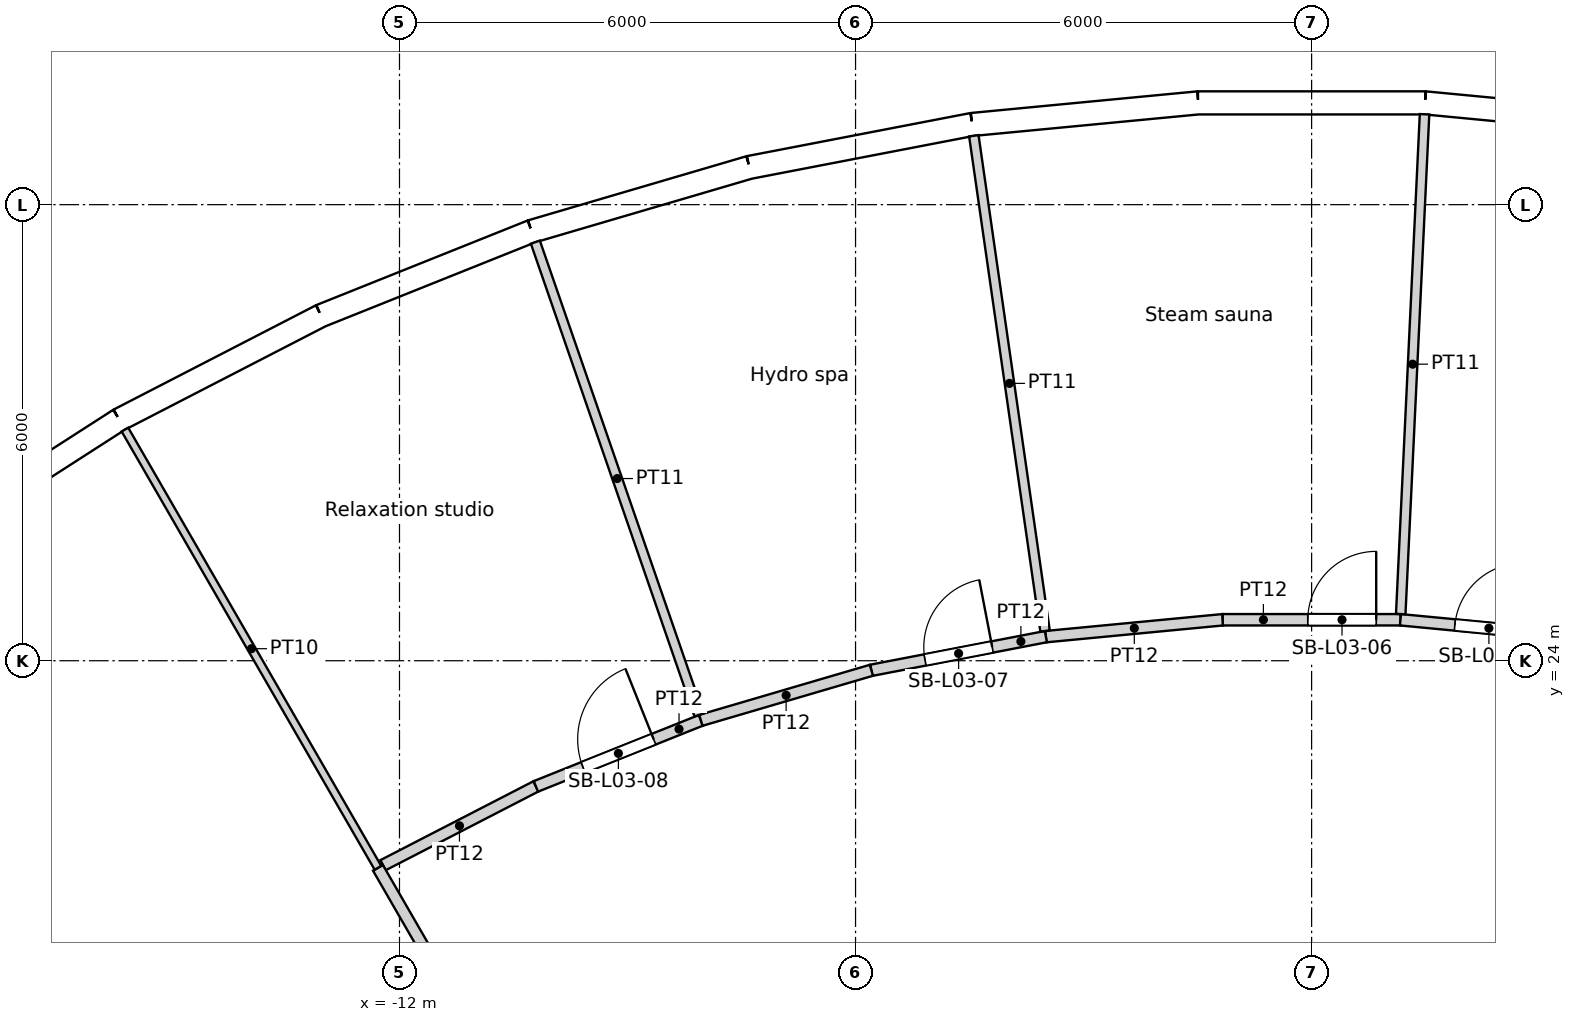
"""IFC4 building model, lengths in metres.
Left out: names, types, materials, properties, quantities, classifications, styles, units other than length and angle.
Written with IfcOpenShell. Run it as: python <this file> out.ifc"""

import sys

from ifc_helpers import new_model, si_unit, direction, frame, frame_2d, origin, origin_2d, place, context, subcontext, project, spatial, rectangle, circle, extrude, element, fill, save


model = new_model("IFC4")
c1 = context("Model", 3, precision=1e-05, world=origin(), true_north=direction((0.0, 1.0)))
c2 = subcontext(c1, "Body", "Model", "MODEL_VIEW")
j1 = project(units=[si_unit("LENGTHUNIT", "METRE"), si_unit("PLANEANGLEUNIT", "RADIAN")], contexts=[c1])
p1 = place(None, origin())
s1 = spatial("IfcSite", under=j1, at=p1, CompositionType="ELEMENT")
p2 = place(p1, origin())
s2 = spatial("IfcBuilding", under=s1, at=p2, CompositionType="ELEMENT")
p3 = place(p2, frame((0.0, 0.0, 18.6)))
s3 = spatial("IfcBuildingStorey", under=s2, at=p3, CompositionType="ELEMENT", Elevation=18.6)
for number, where, z_axis, x_axis in (
    (1, (1.44, 30.24, 0.0), (0.0, 0.0, 1.0), (1.0, 0.0, 0.0)),
    (2, (-4.309, 29.966, 0.0), (0.0, 0.0, 1.0), (1.0, 0.0, 0.0)),
    (3, (-9.902, 28.61, 0.0), (0.0, 0.0, 1.0), (1.0, 0.0, 0.0)),
    (4, (-15.137, 26.219, 0.0), (0.0, 0.0, 1.0), (1.0, 0.0, 0.0)),
):
    element("IfcColumn", number, at=place(p3, frame(where, z_axis=z_axis, x_axis=x_axis)), inside=s3, PredefinedType="COLUMN", context=c2, shape_type="SweptSolid", body=[
        extrude(circle(Radius=0.7, at=origin_2d()), origin(), (0.0, 0.0, 1.0), 4.8),
    ])
for number, where, z_axis, x_axis in (
    (5, (-1.427, 24.506, 0.0), (0.0, 0.0, 1.0), (1.0, 0.0, 0.0)),
    (6, (-7.04, 23.516, 0.0), (0.0, 0.0, 1.0), (1.0, 0.0, 0.0)),
    (7, (-12.274, 21.259, 0.0), (0.0, 0.0, 1.0), (1.0, 0.0, 0.0)),
):
    element("IfcColumn", number, at=place(p3, frame(where, z_axis=z_axis, x_axis=x_axis)), inside=s3, PredefinedType="COLUMN", context=c2, shape_type="SweptSolid", body=[
        extrude(circle(Radius=0.75, at=origin_2d()), origin(), (0.0, 0.0, 1.0), 4.8),
    ])
p4 = place(p3, frame((4.465, 31.055, 0.0), z_axis=(0.0, 0.0, 1.0), x_axis=(-0.99547560533, 0.095017467833, 0.0)))
e8 = element("IfcWall", 8, at=p4, inside=s3, PredefinedType="SOLIDWALL", context=c2, shape_type="SweptSolid", body=[
    extrude(rectangle(XDim=2.986, YDim=0.3, at=frame_2d((1.493, 0.0))), origin(), (0.0, 0.0, 1.0), 4.35),
])
p5 = place(p4, frame((1.493, 0.0, 2.0)))
e9 = element("IfcOpeningElement", 9, at=p5, cuts=e8, PredefinedType="OPENING", context=c2, shape_type="SweptSolid", body=[
    extrude(circle(Radius=1.2, at=origin_2d()), frame((0.0, 0.16, 0.0), z_axis=(0.0, -1.0, 0.0), x_axis=(1.0, 0.0, 0.0)), (0.0, 0.0, 1.0), 0.32),
])
p6 = place(p3, frame((1.493, 31.339, 0.0), z_axis=(0.0, 0.0, 1.0), x_axis=(-1.0, 0.0, 0.0)))
e10 = element("IfcWall", 10, at=p6, inside=s3, PredefinedType="SOLIDWALL", context=c2, shape_type="SweptSolid", body=[
    extrude(rectangle(XDim=2.986, YDim=0.3, at=frame_2d((1.493, 0.0))), origin(), (0.0, 0.0, 1.0), 4.35),
])
p7 = place(p6, frame((1.493, 0.0, 2.0)))
e11 = element("IfcOpeningElement", 11, at=p7, cuts=e10, PredefinedType="OPENING", context=c2, shape_type="SweptSolid", body=[
    extrude(circle(Radius=1.2, at=origin_2d()), frame((0.0, 0.16, 0.0), z_axis=(0.0, -1.0, 0.0), x_axis=(1.0, 0.0, 0.0)), (0.0, 0.0, 1.0), 0.32),
])
p8 = place(p3, frame((-1.493, 31.339, 0.0), z_axis=(0.0, 0.0, 1.0), x_axis=(-0.99547560533, -0.095017467833, 0.0)))
e12 = element("IfcWall", 12, at=p8, inside=s3, PredefinedType="SOLIDWALL", context=c2, shape_type="SweptSolid", body=[
    extrude(rectangle(XDim=2.986, YDim=0.3, at=frame_2d((1.493, 0.0))), origin(), (0.0, 0.0, 1.0), 4.35),
])
p9 = place(p8, frame((1.493, 0.0, 2.0)))
e13 = element("IfcOpeningElement", 13, at=p9, cuts=e12, PredefinedType="OPENING", context=c2, shape_type="SweptSolid", body=[
    extrude(circle(Radius=1.2, at=origin_2d()), frame((0.0, 0.16, 0.0), z_axis=(0.0, -1.0, 0.0), x_axis=(1.0, 0.0, 0.0)), (0.0, 0.0, 1.0), 0.32),
])
p10 = place(p3, frame((-4.465, 31.055, 0.0), z_axis=(0.0, 0.0, 1.0), x_axis=(-0.981918853666, -0.189302310646, 0.0)))
e14 = element("IfcWall", 14, at=p10, inside=s3, PredefinedType="SOLIDWALL", context=c2, shape_type="SweptSolid", body=[
    extrude(rectangle(XDim=2.986, YDim=0.3, at=frame_2d((1.493, 0.0))), origin(), (0.0, 0.0, 1.0), 4.35),
])
p11 = place(p10, frame((1.493, 0.0, 2.0)))
e15 = element("IfcOpeningElement", 15, at=p11, cuts=e14, PredefinedType="OPENING", context=c2, shape_type="SweptSolid", body=[
    extrude(circle(Radius=1.2, at=origin_2d()), frame((0.0, 0.16, 0.0), z_axis=(0.0, -1.0, 0.0), x_axis=(1.0, 0.0, 0.0)), (0.0, 0.0, 1.0), 0.32),
])
p12 = place(p3, frame((-7.397, 30.49, 0.0), z_axis=(0.0, 0.0, 1.0), x_axis=(-0.959502108153, -0.281701445593, 0.0)))
e16 = element("IfcWall", 16, at=p12, inside=s3, PredefinedType="SOLIDWALL", context=c2, shape_type="SweptSolid", body=[
    extrude(rectangle(XDim=2.986, YDim=0.3, at=frame_2d((1.493, 0.0))), origin(), (0.0, 0.0, 1.0), 4.35),
])
p13 = place(p12, frame((1.493, 0.0, 2.0)))
e17 = element("IfcOpeningElement", 17, at=p13, cuts=e16, PredefinedType="OPENING", context=c2, shape_type="SweptSolid", body=[
    extrude(circle(Radius=1.2, at=origin_2d()), frame((0.0, 0.16, 0.0), z_axis=(0.0, -1.0, 0.0), x_axis=(1.0, 0.0, 0.0)), (0.0, 0.0, 1.0), 0.32),
])
p14 = place(p3, frame((-10.261, 29.649, 0.0), z_axis=(0.0, 0.0, 1.0), x_axis=(-0.928380795373, -0.371630325434, 0.0)))
e18 = element("IfcWall", 18, at=p14, inside=s3, PredefinedType="SOLIDWALL", context=c2, shape_type="SweptSolid", body=[
    extrude(rectangle(XDim=2.986, YDim=0.3, at=frame_2d((1.493, 0.0))), origin(), (0.0, 0.0, 1.0), 4.35),
])
p15 = place(p14, frame((1.493, 0.0, 2.0)))
e19 = element("IfcOpeningElement", 19, at=p15, cuts=e18, PredefinedType="OPENING", context=c2, shape_type="SweptSolid", body=[
    extrude(circle(Radius=1.2, at=origin_2d()), frame((0.0, 0.16, 0.0), z_axis=(0.0, -1.0, 0.0), x_axis=(1.0, 0.0, 0.0)), (0.0, 0.0, 1.0), 0.32),
])
p16 = place(p3, frame((-13.033, 28.539, 0.0), z_axis=(0.0, 0.0, 1.0), x_axis=(-0.888831268481, -0.458234630043, 0.0)))
e20 = element("IfcWall", 20, at=p16, inside=s3, PredefinedType="SOLIDWALL", context=c2, shape_type="SweptSolid", body=[
    extrude(rectangle(XDim=2.986, YDim=0.3, at=frame_2d((1.493, 0.0))), origin(), (0.0, 0.0, 1.0), 4.35),
])
p17 = place(p16, frame((1.493, 0.0, 2.0)))
e21 = element("IfcOpeningElement", 21, at=p17, cuts=e20, PredefinedType="OPENING", context=c2, shape_type="SweptSolid", body=[
    extrude(circle(Radius=1.2, at=origin_2d()), frame((0.0, 0.16, 0.0), z_axis=(0.0, -1.0, 0.0), x_axis=(1.0, 0.0, 0.0)), (0.0, 0.0, 1.0), 0.32),
])
p18 = place(p3, frame((-15.687, 27.171, 0.0), z_axis=(0.0, 0.0, 1.0), x_axis=(-0.841242231846, -0.540658401727, 0.0)))
e22 = element("IfcWall", 22, at=p18, inside=s3, PredefinedType="SOLIDWALL", context=c2, shape_type="SweptSolid", body=[
    extrude(rectangle(XDim=2.986, YDim=0.3, at=frame_2d((1.493, 0.0))), origin(), (0.0, 0.0, 1.0), 4.35),
])
p19 = place(p18, frame((1.493, 0.0, 2.0)))
e23 = element("IfcOpeningElement", 23, at=p19, cuts=e22, PredefinedType="OPENING", context=c2, shape_type="SweptSolid", body=[
    extrude(circle(Radius=1.2, at=origin_2d()), frame((0.0, 0.16, 0.0), z_axis=(0.0, -1.0, 0.0), x_axis=(1.0, 0.0, 0.0)), (0.0, 0.0, 1.0), 0.32),
])
p20 = place(p3, frame((-15.612, 27.041, 0.0), z_axis=(0.0, 0.0, 1.0), x_axis=(0.499980638446, -0.866036581894, 0.0)))
e24 = element("IfcWall", 24, at=p20, inside=s3, PredefinedType="PARTITIONING", context=c2, shape_type="SweptSolid", body=[
    extrude(rectangle(XDim=6.657, YDim=0.1, at=frame_2d((3.329, 0.0))), origin(), (0.0, 0.0, 1.0), 3.75),
])
p21 = place(p3, frame((-12.283, 21.275, 0.0), z_axis=(0.0, 0.0, 1.0), x_axis=(0.500014995272, -0.866016746087, 0.0)))
e25 = element("IfcWall", 25, at=p21, inside=s3, PredefinedType="PARTITIONING", context=c2, shape_type="SweptSolid", body=[
    extrude(rectangle(XDim=10.162, YDim=0.15, at=frame_2d((5.081, 0.0))), origin(), (0.0, 0.0, 1.0), 3.75),
])
p22 = place(p3, frame((-10.212, 29.507, 0.0), z_axis=(0.0, 0.0, 1.0), x_axis=(0.327055786406, -0.945005033097, 0.0)))
e26 = element("IfcWall", 26, at=p22, inside=s3, PredefinedType="PARTITIONING", context=c2, shape_type="SweptSolid", body=[
    extrude(rectangle(XDim=6.583, YDim=0.125, at=frame_2d((3.291, 0.0))), origin(), (0.0, 0.0, 1.0), 3.75),
])
p23 = place(p3, frame((-10.205, 22.347, 0.0), z_axis=(0.0, 0.0, 1.0), x_axis=(-0.888857404952, -0.458183929947, 0.0)))
e27 = element("IfcWall", 27, at=p23, inside=s3, PredefinedType="PARTITIONING", context=c2, shape_type="SweptSolid", body=[
    extrude(rectangle(XDim=2.263, YDim=0.15, at=frame_2d((1.131, 0.0))), origin(), (0.0, 0.0, 1.0), 3.75),
])
p24 = place(p3, frame((-10.205, 22.347, 0.0), z_axis=(0.0, 0.0, 1.0), x_axis=(0.92836862221, 0.371660734133, 0.0)))
e28 = element("IfcWall", 28, at=p24, inside=s3, PredefinedType="PARTITIONING", context=c2, shape_type="SweptSolid", body=[
    extrude(rectangle(XDim=2.338, YDim=0.15, at=frame_2d((1.169, 0.0))), origin(), (0.0, 0.0, 1.0), 3.75),
])
p25 = place(p24, frame((0.669, 0.0, 0.0)))
e29 = element("IfcOpeningElement", 29, at=p25, cuts=e28, PredefinedType="OPENING", context=c2, shape_type="SweptSolid", body=[
    extrude(rectangle(XDim=1.0, YDim=2.1, at=frame_2d((0.5, 1.05))), frame((0.0, 0.075, 0.0), z_axis=(0.0, -1.0, 0.0), x_axis=(1.0, 0.0, 0.0)), (0.0, 0.0, 1.0), 0.15),
])
p26 = place(p3, frame((-5.792, 23.874, 0.0), z_axis=(0.0, 0.0, 1.0), x_axis=(-0.959488462959, -0.28174791827, 0.0)))
e30 = element("IfcWall", 30, at=p26, inside=s3, PredefinedType="PARTITIONING", context=c2, shape_type="SweptSolid", body=[
    extrude(rectangle(XDim=2.338, YDim=0.15, at=frame_2d((1.169, 0.0))), origin(), (0.0, 0.0, 1.0), 3.75),
])
p27 = place(p3, frame((-4.444, 30.906, 0.0), z_axis=(0.0, 0.0, 1.0), x_axis=(0.142314426487, -0.989821501087, 0.0)))
e31 = element("IfcWall", 31, at=p27, inside=s3, PredefinedType="PARTITIONING", context=c2, shape_type="SweptSolid", body=[
    extrude(rectangle(XDim=6.582, YDim=0.125, at=frame_2d((3.291, 0.0))), origin(), (0.0, 0.0, 1.0), 3.75),
])
p28 = place(p3, frame((-5.792, 23.874, 0.0), z_axis=(0.0, 0.0, 1.0), x_axis=(0.981934124814, 0.189223081374, 0.0)))
e32 = element("IfcWall", 32, at=p28, inside=s3, PredefinedType="PARTITIONING", context=c2, shape_type="SweptSolid", body=[
    extrude(rectangle(XDim=2.338, YDim=0.15, at=frame_2d((1.169, 0.0))), origin(), (0.0, 0.0, 1.0), 3.75),
])
p29 = place(p28, frame((0.719, 0.0, 0.0)))
e33 = element("IfcOpeningElement", 33, at=p29, cuts=e32, PredefinedType="OPENING", context=c2, shape_type="SweptSolid", body=[
    extrude(rectangle(XDim=0.9, YDim=2.1, at=frame_2d((0.45, 1.05))), frame((0.0, 0.075, 0.0), z_axis=(0.0, -1.0, 0.0), x_axis=(1.0, 0.0, 0.0)), (0.0, 0.0, 1.0), 0.15),
])
p30 = place(p3, frame((-1.169, 24.539, 0.0), z_axis=(0.0, 0.0, 1.0), x_axis=(-0.995473855736, -0.095035796131, 0.0)))
e34 = element("IfcWall", 34, at=p30, inside=s3, PredefinedType="PARTITIONING", context=c2, shape_type="SweptSolid", body=[
    extrude(rectangle(XDim=2.338, YDim=0.15, at=frame_2d((1.169, 0.0))), origin(), (0.0, 0.0, 1.0), 3.75),
])
p31 = place(p3, frame((-1.169, 24.539, 0.0), z_axis=(0.0, 0.0, 1.0), x_axis=(1.0, 0.0, 0.0)))
e35 = element("IfcWall", 35, at=p31, inside=s3, PredefinedType="PARTITIONING", context=c2, shape_type="SweptSolid", body=[
    extrude(rectangle(XDim=2.338, YDim=0.15, at=frame_2d((1.169, 0.0))), origin(), (0.0, 0.0, 1.0), 3.75),
])
p32 = place(p31, frame((1.119, 0.0, 0.0)))
e36 = element("IfcOpeningElement", 36, at=p32, cuts=e35, PredefinedType="OPENING", context=c2, shape_type="SweptSolid", body=[
    extrude(rectangle(XDim=0.9, YDim=2.1, at=frame_2d((0.45, 1.05))), frame((0.0, 0.075, 0.0), z_axis=(0.0, -1.0, 0.0), x_axis=(1.0, 0.0, 0.0)), (0.0, 0.0, 1.0), 0.15),
])
p33 = place(p3, frame((1.486, 31.189, 0.0), z_axis=(0.0, 0.0, 1.0), x_axis=(-0.047549289688, -0.998868892823, 0.0)))
e37 = element("IfcWall", 37, at=p33, inside=s3, PredefinedType="PARTITIONING", context=c2, shape_type="SweptSolid", body=[
    extrude(rectangle(XDim=6.582, YDim=0.125, at=frame_2d((3.291, 0.0))), origin(), (0.0, 0.0, 1.0), 3.75),
])
p34 = place(p3, frame((1.169, 24.539, 0.0), z_axis=(0.0, 0.0, 1.0), x_axis=(0.995473855736, -0.095035796131, 0.0)))
e38 = element("IfcWall", 38, at=p34, inside=s3, PredefinedType="PARTITIONING", context=c2, shape_type="SweptSolid", body=[
    extrude(rectangle(XDim=2.338, YDim=0.15, at=frame_2d((1.169, 0.0))), origin(), (0.0, 0.0, 1.0), 3.75),
])
p35 = place(p34, frame((0.719, 0.0, 0.0)))
e39 = element("IfcOpeningElement", 39, at=p35, cuts=e38, PredefinedType="OPENING", context=c2, shape_type="SweptSolid", body=[
    extrude(rectangle(XDim=0.9, YDim=2.1, at=frame_2d((0.45, 1.05))), frame((0.0, 0.075, 0.0), z_axis=(0.0, -1.0, 0.0), x_axis=(1.0, 0.0, 0.0)), (0.0, 0.0, 1.0), 0.15),
])
p36 = place(p5, origin())
e40 = element("IfcWindow", 40, at=p36, inside=s3, PartitioningType="SINGLE_PANEL", PredefinedType="WINDOW", context=c2, shape_type="SweptSolid", body=[
    extrude(circle(Radius=1.2, at=origin_2d()), frame((0.0, 0.12, 0.0), z_axis=(0.0, -1.0, 0.0), x_axis=(1.0, 0.0, 0.0)), (0.0, 0.0, 1.0), 0.1),
])
fill(e9, e40)
p37 = place(p7, origin())
e41 = element("IfcWindow", 41, at=p37, inside=s3, PartitioningType="SINGLE_PANEL", PredefinedType="WINDOW", context=c2, shape_type="SweptSolid", body=[
    extrude(circle(Radius=1.2, at=origin_2d()), frame((0.0, 0.12, 0.0), z_axis=(0.0, -1.0, 0.0), x_axis=(1.0, 0.0, 0.0)), (0.0, 0.0, 1.0), 0.1),
])
fill(e11, e41)
p38 = place(p9, origin())
e42 = element("IfcWindow", 42, at=p38, inside=s3, PartitioningType="SINGLE_PANEL", PredefinedType="WINDOW", context=c2, shape_type="SweptSolid", body=[
    extrude(circle(Radius=1.2, at=origin_2d()), frame((0.0, 0.12, 0.0), z_axis=(0.0, -1.0, 0.0), x_axis=(1.0, 0.0, 0.0)), (0.0, 0.0, 1.0), 0.1),
])
fill(e13, e42)
p39 = place(p11, origin())
e43 = element("IfcWindow", 43, at=p39, inside=s3, PartitioningType="SINGLE_PANEL", PredefinedType="WINDOW", context=c2, shape_type="SweptSolid", body=[
    extrude(circle(Radius=1.2, at=origin_2d()), frame((0.0, 0.12, 0.0), z_axis=(0.0, -1.0, 0.0), x_axis=(1.0, 0.0, 0.0)), (0.0, 0.0, 1.0), 0.1),
])
fill(e15, e43)
p40 = place(p13, origin())
e44 = element("IfcWindow", 44, at=p40, inside=s3, PartitioningType="SINGLE_PANEL", PredefinedType="WINDOW", context=c2, shape_type="SweptSolid", body=[
    extrude(circle(Radius=1.2, at=origin_2d()), frame((0.0, 0.12, 0.0), z_axis=(0.0, -1.0, 0.0), x_axis=(1.0, 0.0, 0.0)), (0.0, 0.0, 1.0), 0.1),
])
fill(e17, e44)
p41 = place(p15, origin())
e45 = element("IfcWindow", 45, at=p41, inside=s3, PartitioningType="SINGLE_PANEL", PredefinedType="WINDOW", context=c2, shape_type="SweptSolid", body=[
    extrude(circle(Radius=1.2, at=origin_2d()), frame((0.0, 0.12, 0.0), z_axis=(0.0, -1.0, 0.0), x_axis=(1.0, 0.0, 0.0)), (0.0, 0.0, 1.0), 0.1),
])
fill(e19, e45)
p42 = place(p17, origin())
e46 = element("IfcWindow", 46, at=p42, inside=s3, PartitioningType="SINGLE_PANEL", PredefinedType="WINDOW", context=c2, shape_type="SweptSolid", body=[
    extrude(circle(Radius=1.2, at=origin_2d()), frame((0.0, 0.12, 0.0), z_axis=(0.0, -1.0, 0.0), x_axis=(1.0, 0.0, 0.0)), (0.0, 0.0, 1.0), 0.1),
])
fill(e21, e46)
p43 = place(p19, origin())
e47 = element("IfcWindow", 47, at=p43, inside=s3, PartitioningType="SINGLE_PANEL", PredefinedType="WINDOW", context=c2, shape_type="SweptSolid", body=[
    extrude(circle(Radius=1.2, at=origin_2d()), frame((0.0, 0.12, 0.0), z_axis=(0.0, -1.0, 0.0), x_axis=(1.0, 0.0, 0.0)), (0.0, 0.0, 1.0), 0.1),
])
fill(e23, e47)
p44 = place(p35, origin())
e48 = element("IfcDoor", 48, at=p44, inside=s3, OperationType="SINGLE_SWING_RIGHT", PredefinedType="DOOR", context=c2, shape_type="SweptSolid", body=[
    extrude(rectangle(XDim=0.9, YDim=2.1, at=frame_2d((0.45, 1.05))), frame((0.0, 0.025, 0.0), z_axis=(0.0, -1.0, 0.0), x_axis=(1.0, 0.0, 0.0)), (0.0, 0.0, 1.0), 0.05),
])
fill(e39, e48)
p45 = place(p32, origin())
e49 = element("IfcDoor", 49, at=p45, inside=s3, OperationType="SINGLE_SWING_RIGHT", PredefinedType="DOOR", context=c2, shape_type="SweptSolid", body=[
    extrude(rectangle(XDim=0.9, YDim=2.1, at=frame_2d((0.45, 1.05))), frame((0.0, 0.025, 0.0), z_axis=(0.0, -1.0, 0.0), x_axis=(1.0, 0.0, 0.0)), (0.0, 0.0, 1.0), 0.05),
])
fill(e36, e49)
p46 = place(p29, origin())
e50 = element("IfcDoor", 50, at=p46, inside=s3, OperationType="SINGLE_SWING_RIGHT", PredefinedType="DOOR", context=c2, shape_type="SweptSolid", body=[
    extrude(rectangle(XDim=0.9, YDim=2.1, at=frame_2d((0.45, 1.05))), frame((0.0, 0.025, 0.0), z_axis=(0.0, -1.0, 0.0), x_axis=(1.0, 0.0, 0.0)), (0.0, 0.0, 1.0), 0.05),
])
fill(e33, e50)
p47 = place(p25, origin())
e51 = element("IfcDoor", 51, at=p47, inside=s3, OperationType="SINGLE_SWING_RIGHT", PredefinedType="DOOR", context=c2, shape_type="SweptSolid", body=[
    extrude(rectangle(XDim=1.0, YDim=2.1, at=frame_2d((0.5, 1.05))), frame((0.0, 0.025, 0.0), z_axis=(0.0, -1.0, 0.0), x_axis=(1.0, 0.0, 0.0)), (0.0, 0.0, 1.0), 0.05),
])
fill(e29, e51)
save(model, sys.argv[1])
